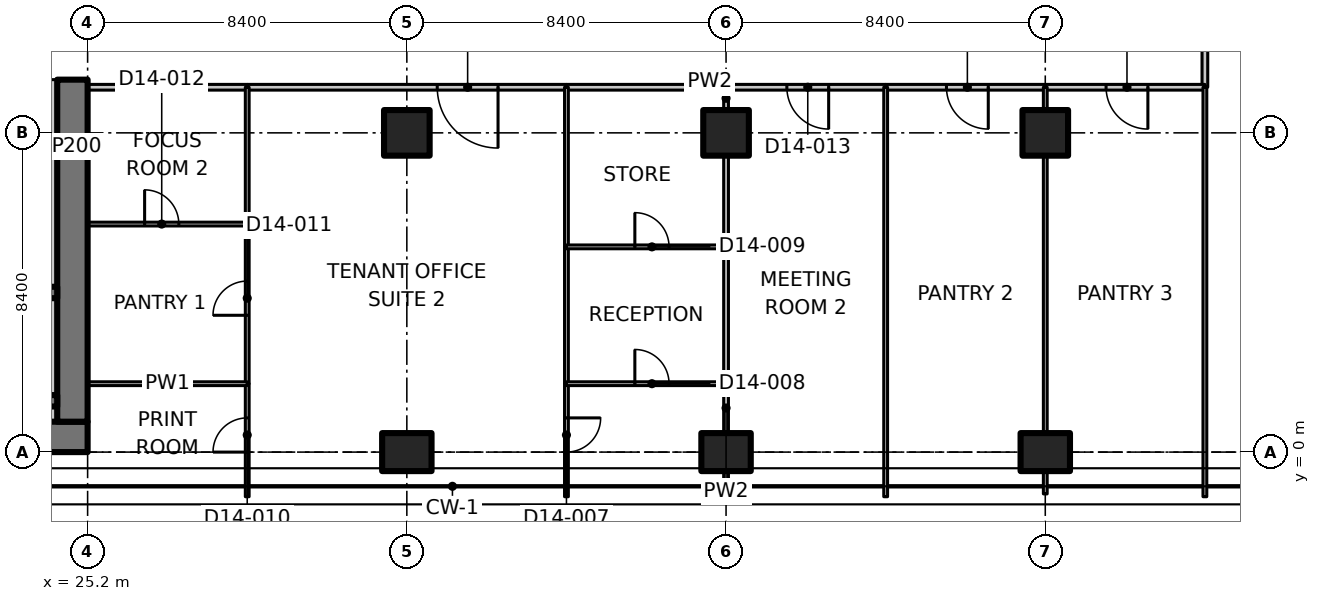
"""IFC4 building model, lengths in metres.
Left out: names, types, materials, properties, quantities, classifications, styles, units other than length and angle.
Written with IfcOpenShell. Run it as: python <this file> out.ifc"""

import sys

from ifc_helpers import new_model, si_unit, direction, frame, frame_2d, origin, origin_2d, place, context, subcontext, project, spatial, polyline, rectangle, outline, extrude, element, fill, save


model = new_model("IFC4")
c1 = context("Model", 3, precision=1e-05, world=origin(), true_north=direction((0.0, 1.0)))
c2 = subcontext(c1, "Body", "Model", "MODEL_VIEW")
j1 = project(units=[si_unit("LENGTHUNIT", "METRE"), si_unit("PLANEANGLEUNIT", "RADIAN")], contexts=[c1])
p1 = place(None, origin())
s1 = spatial("IfcSite", under=j1, at=p1, CompositionType="ELEMENT")
p2 = place(p1, origin())
s2 = spatial("IfcBuilding", under=s1, at=p2, CompositionType="ELEMENT")
p3 = place(p2, frame((0.0, 0.0, 106.1)))
s3 = spatial("IfcBuildingStorey", under=s2, at=p3, CompositionType="ELEMENT", Elevation=106.1)
p4 = place(p3, frame((33.6, 0.0, 0.0), z_axis=(0.0, 0.0, 1.0), x_axis=(0.0, 1.0, 0.0)))
e1 = element("IfcColumn", 1, at=p4, inside=s3, PredefinedType="COLUMN", context=c2, shape_type="SweptSolid", body=[
    extrude(rectangle(XDim=1.0, YDim=1.3, at=origin_2d()), origin(), (0.0, 0.0, 1.0), 3.35),
])
p5 = place(p3, frame((33.6, 8.4, 0.0), z_axis=(0.0, 0.0, 1.0), x_axis=(1.0, 0.0, 0.0)))
e2 = element("IfcColumn", 2, at=p5, inside=s3, PredefinedType="COLUMN", context=c2, shape_type="SweptSolid", body=[
    extrude(rectangle(XDim=1.2, YDim=1.2, at=origin_2d()), origin(), (0.0, 0.0, 1.0), 3.35),
])
p6 = place(p3, frame((42.0, 0.0, 0.0), z_axis=(0.0, 0.0, 1.0), x_axis=(0.0, 1.0, 0.0)))
e3 = element("IfcColumn", 3, at=p6, inside=s3, PredefinedType="COLUMN", context=c2, shape_type="SweptSolid", body=[
    extrude(rectangle(XDim=1.0, YDim=1.3, at=origin_2d()), origin(), (0.0, 0.0, 1.0), 3.35),
])
p7 = place(p3, frame((42.0, 8.4, 0.0), z_axis=(0.0, 0.0, 1.0), x_axis=(1.0, 0.0, 0.0)))
e4 = element("IfcColumn", 4, at=p7, inside=s3, PredefinedType="COLUMN", context=c2, shape_type="SweptSolid", body=[
    extrude(rectangle(XDim=1.2, YDim=1.2, at=origin_2d()), origin(), (0.0, 0.0, 1.0), 3.35),
])
p8 = place(p3, frame((50.4, 0.0, 0.0), z_axis=(0.0, 0.0, 1.0), x_axis=(0.0, 1.0, 0.0)))
e5 = element("IfcColumn", 5, at=p8, inside=s3, PredefinedType="COLUMN", context=c2, shape_type="SweptSolid", body=[
    extrude(rectangle(XDim=1.0, YDim=1.3, at=origin_2d()), origin(), (0.0, 0.0, 1.0), 3.35),
])
p9 = place(p3, frame((50.4, 8.4, 0.0), z_axis=(0.0, 0.0, 1.0), x_axis=(1.0, 0.0, 0.0)))
e6 = element("IfcColumn", 6, at=p9, inside=s3, PredefinedType="COLUMN", context=c2, shape_type="SweptSolid", body=[
    extrude(rectangle(XDim=1.2, YDim=1.2, at=origin_2d()), origin(), (0.0, 0.0, 1.0), 3.35),
])
p10 = place(p3, frame((7.136, 0.4, 0.0), z_axis=(0.0, 0.0, 1.0), x_axis=(1.0, 0.0, 0.0)))
e7 = element("IfcWall", 7, at=p10, inside=s3, PredefinedType="SHEAR", context=c2, shape_type="SweptSolid", body=[
    extrude(rectangle(XDim=18.063, YDim=0.8, at=frame_2d((9.032, 0.0))), origin(), (0.0, 0.0, 1.0), 3.35),
])
p11 = place(p3, frame((24.8, 0.8, 0.0), z_axis=(0.0, 0.0, 1.0), x_axis=(0.0, 1.0, 0.0)))
e8 = element("IfcWall", 8, at=p11, inside=s3, PredefinedType="SHEAR", context=c2, shape_type="SweptSolid", body=[
    extrude(rectangle(XDim=9.0, YDim=0.8, at=frame_2d((4.5, 0.0))), origin(), (0.0, 0.0, 1.0), 3.35),
])
p12 = place(p3, frame((15.8, 1.35, 0.0), z_axis=(0.0, 0.0, 1.0), x_axis=(1.0, 0.0, 0.0)))
e9 = element("IfcWall", 9, at=p12, inside=s3, PredefinedType="SHEAR", context=c2, shape_type="SweptSolid", body=[
    extrude(rectangle(XDim=8.6, YDim=0.3, at=frame_2d((4.3, 0.0))), origin(), (0.0, 0.0, 1.0), 3.35),
])
p13 = place(p3, frame((15.8, 4.2, 0.0), z_axis=(0.0, 0.0, 1.0), x_axis=(1.0, 0.0, 0.0)))
e10 = element("IfcWall", 10, at=p13, inside=s3, PredefinedType="SHEAR", context=c2, shape_type="SweptSolid", body=[
    extrude(rectangle(XDim=8.6, YDim=0.3, at=frame_2d((4.3, 0.0))), origin(), (0.0, 0.0, 1.0), 3.35),
])
p14 = place(p13, frame((0.4, 0.0, 0.0)))
e11 = element("IfcOpeningElement", 11, at=p14, cuts=e10, PredefinedType="OPENING", context=c2, shape_type="SweptSolid", body=[
    extrude(rectangle(XDim=1.0, YDim=2.1, at=frame_2d((0.5, 1.05))), frame((0.0, 0.16, 0.0), z_axis=(0.0, -1.0, 0.0), x_axis=(1.0, 0.0, 0.0)), (0.0, 0.0, 1.0), 0.32),
])
p15 = place(p3, frame((13.35, 1.0, 0.0), z_axis=(0.0, 0.0, 1.0), x_axis=(1.0, 0.0, 0.0)))
e12 = element("IfcWall", 12, at=p15, inside=s3, PredefinedType="PARTITIONING", context=c2, shape_type="SweptSolid", body=[
    extrude(rectangle(XDim=11.05, YDim=0.4, at=frame_2d((5.525, 0.0))), origin(), (0.0, 0.0, 1.0), 3.35),
])
p16 = place(p3, frame((24.2, 1.5, 0.0), z_axis=(0.0, 0.0, 1.0), x_axis=(0.0, 1.0, 0.0)))
e13 = element("IfcWall", 13, at=p16, inside=s3, PredefinedType="PARTITIONING", context=c2, shape_type="SweptSolid", body=[
    extrude(rectangle(XDim=2.55, YDim=0.4, at=frame_2d((1.275, 0.0))), origin(), (0.0, 0.0, 1.0), 3.35),
])
p17 = place(p3, frame((24.2, 4.35, 0.0), z_axis=(0.0, 0.0, 1.0), x_axis=(0.0, 1.0, 0.0)))
e14 = element("IfcWall", 14, at=p17, inside=s3, PredefinedType="PARTITIONING", context=c2, shape_type="SweptSolid", body=[
    extrude(rectangle(XDim=5.45, YDim=0.4, at=frame_2d((2.725, 0.0))), origin(), (0.0, 0.0, 1.0), 3.35),
])
p18 = place(p3, frame((29.4, 9.6, 0.0), z_axis=(0.0, 0.0, 1.0), x_axis=(-1.0, 0.0, 0.0)))
e15 = element("IfcWall", 15, at=p18, inside=s3, PredefinedType="PARTITIONING", context=c2, shape_type="SweptSolid", body=[
    extrude(rectangle(XDim=4.2, YDim=0.15, at=frame_2d((2.1, 0.0))), origin(), (0.0, 0.0, 1.0), 3.33),
])
p19 = place(p3, frame((54.6, 13.0, 0.0), z_axis=(0.0, 0.0, 1.0), x_axis=(0.0, -1.0, 0.0)))
e16 = element("IfcWall", 16, at=p19, inside=s3, PredefinedType="PARTITIONING", context=c2, shape_type="SweptSolid", body=[
    extrude(rectangle(XDim=3.4, YDim=0.15, at=frame_2d((1.7, 0.0))), origin(), (0.0, 0.0, 1.0), 3.33),
])
p20 = place(p3, frame((37.8, 9.6, 0.0), z_axis=(0.0, 0.0, 1.0), x_axis=(-1.0, 0.0, 0.0)))
e17 = element("IfcWall", 17, at=p20, inside=s3, PredefinedType="PARTITIONING", context=c2, shape_type="SweptSolid", body=[
    extrude(rectangle(XDim=8.4, YDim=0.15, at=frame_2d((4.2, 0.0))), origin(), (0.0, 0.0, 1.0), 3.33),
])
p21 = place(p20, frame((1.8, 0.0, 0.0)))
e18 = element("IfcOpeningElement", 18, at=p21, cuts=e17, PredefinedType="OPENING", context=c2, shape_type="SweptSolid", body=[
    extrude(rectangle(XDim=1.6, YDim=2.1, at=frame_2d((0.8, 1.05))), frame((0.0, 0.085, 0.0), z_axis=(0.0, -1.0, 0.0), x_axis=(1.0, 0.0, 0.0)), (0.0, 0.0, 1.0), 0.17),
])
p22 = place(p3, frame((42.0, 9.6, 0.0), z_axis=(0.0, 0.0, 1.0), x_axis=(-1.0, 0.0, 0.0)))
e19 = element("IfcWall", 19, at=p22, inside=s3, PredefinedType="PARTITIONING", context=c2, shape_type="SweptSolid", body=[
    extrude(rectangle(XDim=4.2, YDim=0.15, at=frame_2d((2.1, 0.0))), origin(), (0.0, 0.0, 1.0), 3.33),
])
p23 = place(p3, frame((46.2, 9.6, 0.0), z_axis=(0.0, 0.0, 1.0), x_axis=(-1.0, 0.0, 0.0)))
e20 = element("IfcWall", 20, at=p23, inside=s3, PredefinedType="PARTITIONING", context=c2, shape_type="SweptSolid", body=[
    extrude(rectangle(XDim=4.2, YDim=0.15, at=frame_2d((2.1, 0.0))), origin(), (0.0, 0.0, 1.0), 3.33),
])
p24 = place(p23, frame((1.5, 0.0, 0.0)))
e21 = element("IfcOpeningElement", 21, at=p24, cuts=e20, PredefinedType="OPENING", context=c2, shape_type="SweptSolid", body=[
    extrude(rectangle(XDim=1.1, YDim=2.1, at=frame_2d((0.55, 1.05))), frame((0.0, 0.085, 0.0), z_axis=(0.0, -1.0, 0.0), x_axis=(1.0, 0.0, 0.0)), (0.0, 0.0, 1.0), 0.17),
])
p25 = place(p3, frame((50.4, 9.6, 0.0), z_axis=(0.0, 0.0, 1.0), x_axis=(-1.0, 0.0, 0.0)))
e22 = element("IfcWall", 22, at=p25, inside=s3, PredefinedType="PARTITIONING", context=c2, shape_type="SweptSolid", body=[
    extrude(rectangle(XDim=4.2, YDim=0.15, at=frame_2d((2.1, 0.0))), origin(), (0.0, 0.0, 1.0), 3.33),
])
p26 = place(p25, frame((1.5, 0.0, 0.0)))
e23 = element("IfcOpeningElement", 23, at=p26, cuts=e22, PredefinedType="OPENING", context=c2, shape_type="SweptSolid", body=[
    extrude(rectangle(XDim=1.1, YDim=2.1, at=frame_2d((0.55, 1.05))), frame((0.0, 0.085, 0.0), z_axis=(0.0, -1.0, 0.0), x_axis=(1.0, 0.0, 0.0)), (0.0, 0.0, 1.0), 0.17),
])
p27 = place(p3, frame((54.6, 9.6, 0.0), z_axis=(0.0, 0.0, 1.0), x_axis=(-1.0, 0.0, 0.0)))
e24 = element("IfcWall", 24, at=p27, inside=s3, PredefinedType="PARTITIONING", context=c2, shape_type="SweptSolid", body=[
    extrude(rectangle(XDim=4.2, YDim=0.15, at=frame_2d((2.1, 0.0))), origin(), (0.0, 0.0, 1.0), 3.33),
])
p28 = place(p27, frame((1.5, 0.0, 0.0)))
e25 = element("IfcOpeningElement", 25, at=p28, cuts=e24, PredefinedType="OPENING", context=c2, shape_type="SweptSolid", body=[
    extrude(rectangle(XDim=1.1, YDim=2.1, at=frame_2d((0.55, 1.05))), frame((0.0, 0.085, 0.0), z_axis=(0.0, -1.0, 0.0), x_axis=(1.0, 0.0, 0.0)), (0.0, 0.0, 1.0), 0.17),
])
p29 = place(p3, frame((54.6, -1.174, 0.0), z_axis=(0.0, 0.0, 1.0), x_axis=(0.0, 1.0, 0.0)))
e26 = element("IfcWall", 26, at=p29, inside=s3, PredefinedType="PARTITIONING", context=c2, shape_type="SweptSolid", body=[
    extrude(outline(polyline([(0.0, 0.0), (10.774, 0.0), (10.774, 3.33), (1.624, 3.33), (1.622, 2.98), (0.726, 2.98), (0.724, 3.33), (0.074, 3.33), (0.0, 3.33), (0.0, 0.0)])), frame((0.0, 0.05, 0.0), z_axis=(0.0, -1.0, 0.0), x_axis=(1.0, 0.0, 0.0)), (0.0, 0.0, 1.0), 0.1),
])
p30 = place(p3, frame((37.8, 1.8, 0.0), z_axis=(0.0, 0.0, 1.0), x_axis=(0.0, -1.0, 0.0)))
e27 = element("IfcWall", 27, at=p30, inside=s3, PredefinedType="PARTITIONING", context=c2, shape_type="SweptSolid", body=[
    extrude(rectangle(XDim=2.974, YDim=0.1, at=frame_2d((1.487, 0.0))), origin(), (0.0, 0.0, 1.0), 2.98),
])
p31 = place(p30, frame((0.9, 0.0, 0.0)))
e28 = element("IfcOpeningElement", 28, at=p31, cuts=e27, PredefinedType="OPENING", context=c2, shape_type="SweptSolid", body=[
    extrude(rectangle(XDim=0.9, YDim=2.1, at=frame_2d((0.45, 1.05))), frame((0.0, 0.06, 0.0), z_axis=(0.0, -1.0, 0.0), x_axis=(1.0, 0.0, 0.0)), (0.0, 0.0, 1.0), 0.12),
])
p32 = place(p3, frame((37.8, 5.4, 0.0), z_axis=(0.0, 0.0, 1.0), x_axis=(0.0, -1.0, 0.0)))
e29 = element("IfcWall", 29, at=p32, inside=s3, PredefinedType="PARTITIONING", context=c2, shape_type="SweptSolid", body=[
    extrude(rectangle(XDim=3.6, YDim=0.1, at=frame_2d((1.8, 0.0))), origin(), (0.0, 0.0, 1.0), 3.33),
])
p33 = place(p3, frame((37.8, 9.6, 0.0), z_axis=(0.0, 0.0, 1.0), x_axis=(0.0, -1.0, 0.0)))
e30 = element("IfcWall", 30, at=p33, inside=s3, PredefinedType="PARTITIONING", context=c2, shape_type="SweptSolid", body=[
    extrude(rectangle(XDim=4.2, YDim=0.1, at=frame_2d((2.1, 0.0))), origin(), (0.0, 0.0, 1.0), 3.33),
])
p34 = place(p3, frame((29.4, -1.174, 0.0), z_axis=(0.0, 0.0, 1.0), x_axis=(0.0, 1.0, 0.0)))
e31 = element("IfcWall", 31, at=p34, inside=s3, PredefinedType="PARTITIONING", context=c2, shape_type="SweptSolid", body=[
    extrude(rectangle(XDim=2.974, YDim=0.1, at=frame_2d((1.487, 0.0))), origin(), (0.0, 0.0, 1.0), 2.98),
])
p35 = place(p34, frame((1.174, 0.0, 0.0)))
e32 = element("IfcOpeningElement", 32, at=p35, cuts=e31, PredefinedType="OPENING", context=c2, shape_type="SweptSolid", body=[
    extrude(rectangle(XDim=0.9, YDim=2.1, at=frame_2d((0.45, 1.05))), frame((0.0, 0.06, 0.0), z_axis=(0.0, -1.0, 0.0), x_axis=(1.0, 0.0, 0.0)), (0.0, 0.0, 1.0), 0.12),
])
p36 = place(p3, frame((29.4, 1.8, 0.0), z_axis=(0.0, 0.0, 1.0), x_axis=(0.0, 1.0, 0.0)))
e33 = element("IfcWall", 33, at=p36, inside=s3, PredefinedType="PARTITIONING", context=c2, shape_type="SweptSolid", body=[
    extrude(rectangle(XDim=4.2, YDim=0.1, at=frame_2d((2.1, 0.0))), origin(), (0.0, 0.0, 1.0), 3.33),
])
p37 = place(p36, frame((1.8, 0.0, 0.0)))
e34 = element("IfcOpeningElement", 34, at=p37, cuts=e33, PredefinedType="OPENING", context=c2, shape_type="SweptSolid", body=[
    extrude(rectangle(XDim=0.9, YDim=2.1, at=frame_2d((0.45, 1.05))), frame((0.0, 0.06, 0.0), z_axis=(0.0, -1.0, 0.0), x_axis=(1.0, 0.0, 0.0)), (0.0, 0.0, 1.0), 0.12),
])
p38 = place(p3, frame((29.4, 6.0, 0.0), z_axis=(0.0, 0.0, 1.0), x_axis=(0.0, 1.0, 0.0)))
e35 = element("IfcWall", 35, at=p38, inside=s3, PredefinedType="PARTITIONING", context=c2, shape_type="SweptSolid", body=[
    extrude(rectangle(XDim=3.6, YDim=0.1, at=frame_2d((1.8, 0.0))), origin(), (0.0, 0.0, 1.0), 3.33),
])
p39 = place(p3, frame((37.8, 1.8, 0.0), z_axis=(0.0, 0.0, 1.0), x_axis=(1.0, 0.0, 0.0)))
e36 = element("IfcWall", 36, at=p39, inside=s3, PredefinedType="PARTITIONING", context=c2, shape_type="SweptSolid", body=[
    extrude(rectangle(XDim=4.2, YDim=0.1, at=frame_2d((2.1, 0.0))), origin(), (0.0, 0.0, 1.0), 3.33),
])
p40 = place(p39, frame((1.8, 0.0, 0.0)))
e37 = element("IfcOpeningElement", 37, at=p40, cuts=e36, PredefinedType="OPENING", context=c2, shape_type="SweptSolid", body=[
    extrude(rectangle(XDim=0.9, YDim=2.1, at=frame_2d((0.45, 1.05))), frame((0.0, 0.06, 0.0), z_axis=(0.0, -1.0, 0.0), x_axis=(1.0, 0.0, 0.0)), (0.0, 0.0, 1.0), 0.12),
])
p41 = place(p3, frame((42.0, 1.8, 0.0), z_axis=(0.0, 0.0, 1.0), x_axis=(0.0, -1.0, 0.0)))
e38 = element("IfcWall", 38, at=p41, inside=s3, PredefinedType="PARTITIONING", context=c2, shape_type="SweptSolid", body=[
    extrude(rectangle(XDim=1.28, YDim=0.125, at=frame_2d((0.64, 0.0))), origin(), (0.0, 0.0, 1.0), 3.33),
])
p42 = place(p3, frame((42.0, -0.52, 0.0), z_axis=(0.0, 0.0, 1.0), x_axis=(0.0, -1.0, 0.0)))
e39 = element("IfcWall", 39, at=p42, inside=s3, PredefinedType="PARTITIONING", context=c2, shape_type="SweptSolid", body=[
    extrude(rectangle(XDim=0.58, YDim=0.125, at=frame_2d((0.29, 0.0))), origin(), (0.0, 0.0, 1.0), 3.33),
])
p43 = place(p3, frame((37.8, 5.4, 0.0), z_axis=(0.0, 0.0, 1.0), x_axis=(1.0, 0.0, 0.0)))
e40 = element("IfcWall", 40, at=p43, inside=s3, PredefinedType="PARTITIONING", context=c2, shape_type="SweptSolid", body=[
    extrude(rectangle(XDim=4.2, YDim=0.1, at=frame_2d((2.1, 0.0))), origin(), (0.0, 0.0, 1.0), 3.33),
])
p44 = place(p43, frame((1.8, 0.0, 0.0)))
e41 = element("IfcOpeningElement", 41, at=p44, cuts=e40, PredefinedType="OPENING", context=c2, shape_type="SweptSolid", body=[
    extrude(rectangle(XDim=0.9, YDim=2.1, at=frame_2d((0.45, 1.05))), frame((0.0, 0.06, 0.0), z_axis=(0.0, -1.0, 0.0), x_axis=(1.0, 0.0, 0.0)), (0.0, 0.0, 1.0), 0.12),
])
p45 = place(p3, frame((42.0, 5.4, 0.0), z_axis=(0.0, 0.0, 1.0), x_axis=(0.0, -1.0, 0.0)))
e42 = element("IfcWall", 42, at=p45, inside=s3, PredefinedType="PARTITIONING", context=c2, shape_type="SweptSolid", body=[
    extrude(rectangle(XDim=3.6, YDim=0.125, at=frame_2d((1.8, 0.0))), origin(), (0.0, 0.0, 1.0), 3.33),
])
p46 = place(p3, frame((42.0, 9.6, 0.0), z_axis=(0.0, 0.0, 1.0), x_axis=(0.0, -1.0, 0.0)))
e43 = element("IfcWall", 43, at=p46, inside=s3, PredefinedType="PARTITIONING", context=c2, shape_type="SweptSolid", body=[
    extrude(rectangle(XDim=0.58, YDim=0.125, at=frame_2d((0.29, 0.0))), origin(), (0.0, 0.0, 1.0), 3.33),
])
p47 = place(p3, frame((42.0, 7.78, 0.0), z_axis=(0.0, 0.0, 1.0), x_axis=(0.0, -1.0, 0.0)))
e44 = element("IfcWall", 44, at=p47, inside=s3, PredefinedType="PARTITIONING", context=c2, shape_type="SweptSolid", body=[
    extrude(rectangle(XDim=2.38, YDim=0.125, at=frame_2d((1.19, 0.0))), origin(), (0.0, 0.0, 1.0), 3.33),
])
p48 = place(p3, frame((25.2, 1.8, 0.0), z_axis=(0.0, 0.0, 1.0), x_axis=(1.0, 0.0, 0.0)))
e45 = element("IfcWall", 45, at=p48, inside=s3, PredefinedType="PARTITIONING", context=c2, shape_type="SweptSolid", body=[
    extrude(rectangle(XDim=4.2, YDim=0.1, at=frame_2d((2.1, 0.0))), origin(), (0.0, 0.0, 1.0), 3.33),
])
p49 = place(p3, frame((25.2, 6.0, 0.0), z_axis=(0.0, 0.0, 1.0), x_axis=(1.0, 0.0, 0.0)))
e46 = element("IfcWall", 46, at=p49, inside=s3, PredefinedType="PARTITIONING", context=c2, shape_type="SweptSolid", body=[
    extrude(rectangle(XDim=4.2, YDim=0.1, at=frame_2d((2.1, 0.0))), origin(), (0.0, 0.0, 1.0), 3.33),
])
p50 = place(p49, frame((1.5, 0.0, 0.0)))
e47 = element("IfcOpeningElement", 47, at=p50, cuts=e46, PredefinedType="OPENING", context=c2, shape_type="SweptSolid", body=[
    extrude(rectangle(XDim=0.9, YDim=2.1, at=frame_2d((0.45, 1.05))), frame((0.0, 0.06, 0.0), z_axis=(0.0, -1.0, 0.0), x_axis=(1.0, 0.0, 0.0)), (0.0, 0.0, 1.0), 0.12),
])
p51 = place(p3, frame((46.2, 9.6, 0.0), z_axis=(0.0, 0.0, 1.0), x_axis=(0.0, -1.0, 0.0)))
e48 = element("IfcWall", 48, at=p51, inside=s3, PredefinedType="PARTITIONING", context=c2, shape_type="SweptSolid", body=[
    extrude(outline(polyline([(0.0, 0.0), (10.774, 0.0), (10.774, 3.33), (10.7, 3.33), (10.05, 3.33), (10.048, 2.98), (9.152, 2.98), (9.15, 3.33), (0.0, 3.33), (0.0, 0.0)])), frame((0.0, 0.05, 0.0), z_axis=(0.0, -1.0, 0.0), x_axis=(1.0, 0.0, 0.0)), (0.0, 0.0, 1.0), 0.1),
])
p52 = place(p3, frame((50.4, 9.6, 0.0), z_axis=(0.0, 0.0, 1.0), x_axis=(0.0, -1.0, 0.0)))
e49 = element("IfcWall", 49, at=p52, inside=s3, PredefinedType="PARTITIONING", context=c2, shape_type="SweptSolid", body=[
    extrude(rectangle(XDim=0.58, YDim=0.1, at=frame_2d((0.29, 0.0))), origin(), (0.0, 0.0, 1.0), 3.33),
])
p53 = place(p3, frame((50.4, 7.78, 0.0), z_axis=(0.0, 0.0, 1.0), x_axis=(0.0, -1.0, 0.0)))
e50 = element("IfcWall", 50, at=p53, inside=s3, PredefinedType="PARTITIONING", context=c2, shape_type="SweptSolid", body=[
    extrude(rectangle(XDim=7.26, YDim=0.1, at=frame_2d((3.63, 0.0))), origin(), (0.0, 0.0, 1.0), 3.33),
])
p54 = place(p3, frame((50.4, -0.52, 0.0), z_axis=(0.0, 0.0, 1.0), x_axis=(0.0, -1.0, 0.0)))
e51 = element("IfcWall", 51, at=p54, inside=s3, PredefinedType="PARTITIONING", context=c2, shape_type="SweptSolid", body=[
    extrude(rectangle(XDim=0.58, YDim=0.1, at=frame_2d((0.29, 0.0))), origin(), (0.0, 0.0, 1.0), 3.33),
])
p55 = place(p21, origin())
e52 = element("IfcDoor", 52, at=p55, inside=s3, OperationType="DOUBLE_DOOR_SINGLE_SWING", PredefinedType="DOOR", context=c2, shape_type="SweptSolid", body=[
    extrude(rectangle(XDim=1.6, YDim=2.1, at=frame_2d((0.8, 1.05))), frame((0.0, 0.025, 0.0), z_axis=(0.0, -1.0, 0.0), x_axis=(1.0, 0.0, 0.0)), (0.0, 0.0, 1.0), 0.05),
])
fill(e18, e52)
p56 = place(p31, origin())
e53 = element("IfcDoor", 53, at=p56, inside=s3, OperationType="SINGLE_SWING_LEFT", PredefinedType="DOOR", context=c2, shape_type="SweptSolid", body=[
    extrude(rectangle(XDim=0.9, YDim=2.1, at=frame_2d((0.45, 1.05))), frame((0.0, 0.025, 0.0), z_axis=(0.0, -1.0, 0.0), x_axis=(1.0, 0.0, 0.0)), (0.0, 0.0, 1.0), 0.05),
])
fill(e28, e53)
p57 = place(p40, origin())
e54 = element("IfcDoor", 54, at=p57, inside=s3, OperationType="SINGLE_SWING_LEFT", PredefinedType="DOOR", context=c2, shape_type="SweptSolid", body=[
    extrude(rectangle(XDim=0.9, YDim=2.1, at=frame_2d((0.45, 1.05))), frame((0.0, 0.025, 0.0), z_axis=(0.0, -1.0, 0.0), x_axis=(1.0, 0.0, 0.0)), (0.0, 0.0, 1.0), 0.05),
])
fill(e37, e54)
p58 = place(p44, origin())
e55 = element("IfcDoor", 55, at=p58, inside=s3, OperationType="SINGLE_SWING_LEFT", PredefinedType="DOOR", context=c2, shape_type="SweptSolid", body=[
    extrude(rectangle(XDim=0.9, YDim=2.1, at=frame_2d((0.45, 1.05))), frame((0.0, 0.025, 0.0), z_axis=(0.0, -1.0, 0.0), x_axis=(1.0, 0.0, 0.0)), (0.0, 0.0, 1.0), 0.05),
])
fill(e41, e55)
p59 = place(p35, origin())
e56 = element("IfcDoor", 56, at=p59, inside=s3, OperationType="SINGLE_SWING_LEFT", PredefinedType="DOOR", context=c2, shape_type="SweptSolid", body=[
    extrude(rectangle(XDim=0.9, YDim=2.1, at=frame_2d((0.45, 1.05))), frame((0.0, 0.025, 0.0), z_axis=(0.0, -1.0, 0.0), x_axis=(1.0, 0.0, 0.0)), (0.0, 0.0, 1.0), 0.05),
])
fill(e32, e56)
p60 = place(p37, origin())
e57 = element("IfcDoor", 57, at=p60, inside=s3, OperationType="SINGLE_SWING_LEFT", PredefinedType="DOOR", context=c2, shape_type="SweptSolid", body=[
    extrude(rectangle(XDim=0.9, YDim=2.1, at=frame_2d((0.45, 1.05))), frame((0.0, 0.025, 0.0), z_axis=(0.0, -1.0, 0.0), x_axis=(1.0, 0.0, 0.0)), (0.0, 0.0, 1.0), 0.05),
])
fill(e34, e57)
p61 = place(p50, origin())
e58 = element("IfcDoor", 58, at=p61, inside=s3, OperationType="SINGLE_SWING_LEFT", PredefinedType="DOOR", context=c2, shape_type="SweptSolid", body=[
    extrude(rectangle(XDim=0.9, YDim=2.1, at=frame_2d((0.45, 1.05))), frame((0.0, 0.025, 0.0), z_axis=(0.0, -1.0, 0.0), x_axis=(1.0, 0.0, 0.0)), (0.0, 0.0, 1.0), 0.05),
])
fill(e47, e58)
p62 = place(p24, origin())
e59 = element("IfcDoor", 59, at=p62, inside=s3, OperationType="SINGLE_SWING_LEFT", PredefinedType="DOOR", context=c2, shape_type="SweptSolid", body=[
    extrude(rectangle(XDim=1.1, YDim=2.1, at=frame_2d((0.55, 1.05))), frame((0.0, 0.025, 0.0), z_axis=(0.0, -1.0, 0.0), x_axis=(1.0, 0.0, 0.0)), (0.0, 0.0, 1.0), 0.05),
])
fill(e21, e59)
p63 = place(p26, origin())
e60 = element("IfcDoor", 60, at=p63, inside=s3, OperationType="SINGLE_SWING_LEFT", PredefinedType="DOOR", context=c2, shape_type="SweptSolid", body=[
    extrude(rectangle(XDim=1.1, YDim=2.1, at=frame_2d((0.55, 1.05))), frame((0.0, 0.025, 0.0), z_axis=(0.0, -1.0, 0.0), x_axis=(1.0, 0.0, 0.0)), (0.0, 0.0, 1.0), 0.05),
])
fill(e23, e60)
p64 = place(p28, origin())
e61 = element("IfcDoor", 61, at=p64, inside=s3, OperationType="SINGLE_SWING_LEFT", PredefinedType="DOOR", context=c2, shape_type="SweptSolid", body=[
    extrude(rectangle(XDim=1.1, YDim=2.1, at=frame_2d((0.55, 1.05))), frame((0.0, 0.025, 0.0), z_axis=(0.0, -1.0, 0.0), x_axis=(1.0, 0.0, 0.0)), (0.0, 0.0, 1.0), 0.05),
])
fill(e25, e61)
save(model, sys.argv[1])
